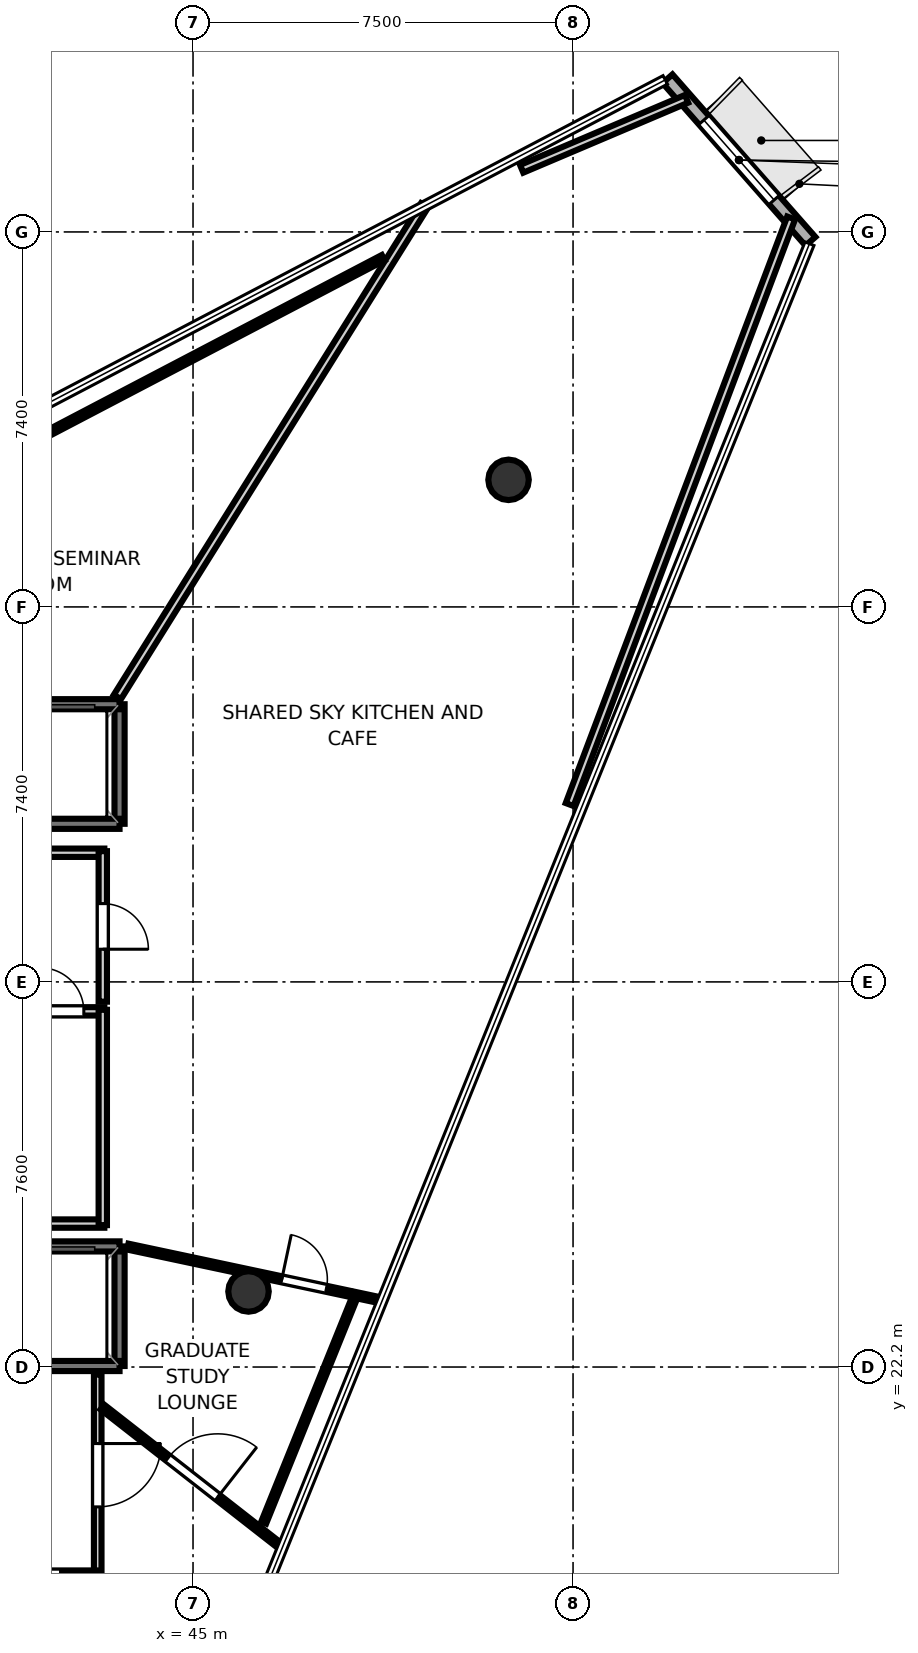
"""IFC4 building model, lengths in metres.
Left out: names, types, materials, properties, quantities, classifications, styles, units other than length and angle.
Written with IfcOpenShell. Run it as: python <this file> out.ifc"""

import sys

from ifc_helpers import new_model, si_unit, direction, frame, frame_2d, origin, origin_2d, place, context, subcontext, project, spatial, rectangle, hollow_circle, extrude, element, fill, save


model = new_model("IFC4")
c1 = context("Model", 3, precision=1e-05, world=origin(), true_north=direction((0.0, 1.0)))
c2 = subcontext(c1, "Body", "Model", "MODEL_VIEW")
j1 = project(units=[si_unit("LENGTHUNIT", "METRE"), si_unit("PLANEANGLEUNIT", "RADIAN")], contexts=[c1])
p1 = place(None, origin())
s1 = spatial("IfcSite", under=j1, at=p1, CompositionType="ELEMENT")
p2 = place(p1, origin())
s2 = spatial("IfcBuilding", under=s1, at=p2, CompositionType="ELEMENT")
p3 = place(p2, frame((0.0, 0.0, 351.8)))
s3 = spatial("IfcBuildingStorey", under=s2, at=p3, CompositionType="ELEMENT", Elevation=351.8)
for number, where, z_axis, x_axis in (
    (1, (51.227, 39.708, 0.0), (0.0, 0.0, 1.0), (1.0, 0.0, 0.0)),
    (2, (46.095, 23.691, 0.0), (0.0, 0.0, 1.0), (1.0, 0.0, 0.0)),
):
    element("IfcColumn", number, at=place(p3, frame(where, z_axis=z_axis, x_axis=x_axis)), inside=s3, PredefinedType="COLUMN", context=c2, shape_type="SweptSolid", body=[
        extrude(hollow_circle(Radius=0.4, WallThickness=0.022, at=origin_2d()), origin(), (0.0, 0.0, 1.0), 4.5),
    ])
p4 = place(p3, frame((57.185, 44.415, 0.0), z_axis=(0.0, 0.0, 1.0), x_axis=(-0.660250400188, 0.751045543926, 0.0)))
e3 = element("IfcWall", 3, at=p4, inside=s3, PredefinedType="SOLIDWALL", context=c2, shape_type="SweptSolid", body=[
    extrude(rectangle(XDim=4.273, YDim=0.26, at=frame_2d((2.136, 0.0))), origin(), (0.0, 0.0, 1.0), 4.3),
])
p5 = place(p4, frame((1.086, 0.0, 0.85)))
e4 = element("IfcOpeningElement", 4, at=p5, cuts=e3, PredefinedType="OPENING", context=c2, shape_type="SweptSolid", body=[
    extrude(rectangle(XDim=2.1, YDim=2.2, at=frame_2d((1.05, 1.1))), frame((0.0, 0.14, 0.0), z_axis=(0.0, -1.0, 0.0), x_axis=(1.0, 0.0, 0.0)), (0.0, 0.0, 1.0), 0.28),
])
p6 = place(p3, frame((43.55, 22.22, 0.0), z_axis=(0.0, 0.0, 1.0), x_axis=(0.0, 1.0, 0.0)))
e5 = element("IfcWall", 5, at=p6, inside=s3, PredefinedType="SOLIDWALL", context=c2, shape_type="SweptSolid", body=[
    extrude(rectangle(XDim=2.36, YDim=0.2, at=frame_2d((1.18, 0.0))), origin(), (0.0, 0.0, 1.0), 4.3),
])
for number, where, z_axis, x_axis in (
    (6, (41.45, 24.58, 0.0), (0.0, 0.0, 1.0), (1.0, 0.0, 0.0)),
    (7, (41.45, 22.22, 0.0), (0.0, 0.0, 1.0), (1.0, 0.0, 0.0)),
):
    element("IfcWall", number, at=place(p3, frame(where, z_axis=z_axis, x_axis=x_axis)), inside=s3, PredefinedType="SOLIDWALL", context=c2, shape_type="SweptSolid", body=[
        extrude(rectangle(XDim=2.1, YDim=0.2, at=frame_2d((1.05, 0.0))), origin(), (0.0, 0.0, 1.0), 4.3),
    ])
p7 = place(p3, frame((43.55, 32.92, 0.0), z_axis=(0.0, 0.0, 1.0), x_axis=(0.0, 1.0, 0.0)))
e8 = element("IfcWall", 8, at=p7, inside=s3, PredefinedType="SOLIDWALL", context=c2, shape_type="SweptSolid", body=[
    extrude(rectangle(XDim=2.36, YDim=0.2, at=frame_2d((1.18, 0.0))), origin(), (0.0, 0.0, 1.0), 4.3),
])
for number, where, z_axis, x_axis in (
    (9, (41.45, 35.28, 0.0), (0.0, 0.0, 1.0), (1.0, 0.0, 0.0)),
    (10, (41.45, 32.92, 0.0), (0.0, 0.0, 1.0), (1.0, 0.0, 0.0)),
):
    element("IfcWall", number, at=place(p3, frame(where, z_axis=z_axis, x_axis=x_axis)), inside=s3, PredefinedType="SOLIDWALL", context=c2, shape_type="SweptSolid", body=[
        extrude(rectangle(XDim=2.1, YDim=0.2, at=frame_2d((1.05, 0.0))), origin(), (0.0, 0.0, 1.0), 4.3),
    ])
p8 = place(p3, frame((43.119, 22.05, 0.0), z_axis=(0.0, 0.0, 1.0), x_axis=(0.0, -1.0, 0.0)))
e11 = element("IfcWall", 11, at=p8, inside=s3, PredefinedType="PARTITIONING", context=c2, shape_type="SweptSolid", body=[
    extrude(rectangle(XDim=3.97, YDim=0.15, at=frame_2d((1.985, 0.0))), origin(), (0.0, 0.0, 1.0), 2.82),
])
p9 = place(p8, frame((1.36, 0.0, 0.0)))
e12 = element("IfcOpeningElement", 12, at=p9, cuts=e11, PredefinedType="OPENING", context=c2, shape_type="SweptSolid", body=[
    extrude(rectangle(XDim=1.25, YDim=2.2, at=frame_2d((0.625, 1.1))), frame((0.0, 0.085, 0.0), z_axis=(0.0, -1.0, 0.0), x_axis=(1.0, 0.0, 0.0)), (0.0, 0.0, 1.0), 0.17),
])
p10 = place(p3, frame((43.15, 18.111, 0.0), z_axis=(0.0, 0.0, 1.0), x_axis=(-1.0, 0.0, 0.0)))
e13 = element("IfcWall", 13, at=p10, inside=s3, PredefinedType="PARTITIONING", context=c2, shape_type="SweptSolid", body=[
    extrude(rectangle(XDim=2.73, YDim=0.15, at=frame_2d((1.365, 0.0))), origin(), (0.0, 0.0, 1.0), 2.82),
])
p11 = place(p10, frame((0.765, 0.0, 0.0)))
e14 = element("IfcOpeningElement", 14, at=p11, cuts=e13, PredefinedType="OPENING", context=c2, shape_type="SweptSolid", body=[
    extrude(rectangle(XDim=1.2, YDim=2.15, at=frame_2d((0.6, 1.075))), frame((0.0, 0.085, 0.0), z_axis=(0.0, -1.0, 0.0), x_axis=(1.0, 0.0, 0.0)), (0.0, 0.0, 1.0), 0.17),
])
p12 = place(p3, frame((43.25, 25.031, 0.0), z_axis=(0.0, 0.0, 1.0), x_axis=(-1.0, 0.0, 0.0)))
e15 = element("IfcWall", 15, at=p12, inside=s3, PredefinedType="PLUMBINGWALL", context=c2, shape_type="SweptSolid", body=[
    extrude(rectangle(XDim=1.67, YDim=0.165, at=frame_2d((0.835, 0.0))), origin(), (0.0, 0.0, 1.0), 2.82),
])
p13 = place(p3, frame((41.58, 29.219, 0.0), z_axis=(0.0, 0.0, 1.0), x_axis=(1.0, 0.0, 0.0)))
e16 = element("IfcWall", 16, at=p13, inside=s3, PredefinedType="PLUMBINGWALL", context=c2, shape_type="SweptSolid", body=[
    extrude(rectangle(XDim=1.67, YDim=0.165, at=frame_2d((0.835, 0.0))), origin(), (0.0, 0.0, 1.0), 2.82),
])
p14 = place(p13, frame((0.405, 0.0, 0.0)))
e17 = element("IfcOpeningElement", 17, at=p14, cuts=e16, PredefinedType="OPENING", context=c2, shape_type="SweptSolid", body=[
    extrude(rectangle(XDim=0.86, YDim=2.05, at=frame_2d((0.43, 1.025))), frame((0.0, 0.093, 0.0), z_axis=(0.0, -1.0, 0.0), x_axis=(1.0, 0.0, 0.0)), (0.0, 0.0, 1.0), 0.185),
])
p15 = place(p3, frame((43.219, 29.25, 0.0), z_axis=(0.0, 0.0, 1.0), x_axis=(0.0, -1.0, 0.0)))
e18 = element("IfcWall", 18, at=p15, inside=s3, PredefinedType="PLUMBINGWALL", context=c2, shape_type="SweptSolid", body=[
    extrude(rectangle(XDim=4.25, YDim=0.165, at=frame_2d((2.125, 0.0))), origin(), (0.0, 0.0, 1.0), 2.82),
])
p16 = place(p3, frame((41.58, 32.349, 0.0), z_axis=(0.0, 0.0, 1.0), x_axis=(1.0, 0.0, 0.0)))
e19 = element("IfcWall", 19, at=p16, inside=s3, PredefinedType="PLUMBINGWALL", context=c2, shape_type="SweptSolid", body=[
    extrude(rectangle(XDim=1.67, YDim=0.165, at=frame_2d((0.835, 0.0))), origin(), (0.0, 0.0, 1.0), 2.82),
])
p17 = place(p3, frame((43.219, 32.38, 0.0), z_axis=(0.0, 0.0, 1.0), x_axis=(0.0, -1.0, 0.0)))
e20 = element("IfcWall", 20, at=p17, inside=s3, PredefinedType="PLUMBINGWALL", context=c2, shape_type="SweptSolid", body=[
    extrude(rectangle(XDim=2.97, YDim=0.165, at=frame_2d((1.485, 0.0))), origin(), (0.0, 0.0, 1.0), 2.82),
])
p18 = place(p17, frame((1.035, 0.0, 0.0)))
e21 = element("IfcOpeningElement", 21, at=p18, cuts=e20, PredefinedType="OPENING", context=c2, shape_type="SweptSolid", body=[
    extrude(rectangle(XDim=0.9, YDim=2.1, at=frame_2d((0.45, 1.05))), frame((0.0, 0.093, 0.0), z_axis=(0.0, -1.0, 0.0), x_axis=(1.0, 0.0, 0.0)), (0.0, 0.0, 1.0), 0.185),
])
p19 = place(p3, frame((43.211, 21.41, 0.0), z_axis=(0.0, 0.0, 1.0), x_axis=(0.788014562356, -0.615656600318, 0.0)))
e22 = element("IfcWall", 22, at=p19, inside=s3, PredefinedType="PARTITIONING", context=c2, shape_type="SweptSolid", body=[
    extrude(rectangle(XDim=4.527, YDim=0.12, at=frame_2d((2.264, 0.0))), origin(), (0.0, 0.0, 1.0), 2.82),
])
p20 = place(p19, frame((1.638, 0.0, 0.0)))
e23 = element("IfcOpeningElement", 23, at=p20, cuts=e22, PredefinedType="OPENING", context=c2, shape_type="SweptSolid", body=[
    extrude(rectangle(XDim=1.25, YDim=2.2, at=frame_2d((0.625, 1.1))), frame((0.0, 0.07, 0.0), z_axis=(0.0, -1.0, 0.0), x_axis=(1.0, 0.0, 0.0)), (0.0, 0.0, 1.0), 0.14),
])
p21 = place(p3, frame((43.713, 24.576, 0.0), z_axis=(0.0, 0.0, 1.0), x_axis=(0.978143673995, -0.207930163816, 0.0)))
e24 = element("IfcWall", 24, at=p21, inside=s3, PredefinedType="PARTITIONING", context=c2, shape_type="SweptSolid", body=[
    extrude(rectangle(XDim=5.152, YDim=0.12, at=frame_2d((2.576, 0.0))), origin(), (0.0, 0.0, 1.0), 2.82),
])
p22 = place(p21, frame((3.106, 0.0, 0.0)))
e25 = element("IfcOpeningElement", 25, at=p22, cuts=e24, PredefinedType="OPENING", context=c2, shape_type="SweptSolid", body=[
    extrude(rectangle(XDim=0.9, YDim=2.1, at=frame_2d((0.45, 1.05))), frame((0.0, 0.07, 0.0), z_axis=(0.0, -1.0, 0.0), x_axis=(1.0, 0.0, 0.0)), (0.0, 0.0, 1.0), 0.14),
])
p23 = place(p3, frame((48.224, 23.654, 0.0), z_axis=(0.0, 0.0, 1.0), x_axis=(-0.374802895176, -0.927104519333, 0.0)))
e26 = element("IfcWall", 26, at=p23, inside=s3, PredefinedType="PARTITIONING", context=c2, shape_type="SweptSolid", body=[
    extrude(rectangle(XDim=4.882, YDim=0.105, at=frame_2d((2.441, 0.0))), origin(), (0.0, 0.0, 1.0), 2.82),
])
p24 = place(p3, frame((43.508, 35.424, 0.0), z_axis=(0.0, 0.0, 1.0), x_axis=(0.529920277959, 0.848047462709, 0.0)))
e27 = element("IfcWall", 27, at=p24, inside=s3, PredefinedType="PLUMBINGWALL", context=c2, shape_type="SweptSolid", body=[
    extrude(rectangle(XDim=11.438, YDim=0.165, at=frame_2d((5.719, 0.0))), origin(), (0.0, 0.0, 1.0), 2.82),
])
p25 = place(p3, frame((51.486, 45.845, 0.0), z_axis=(0.0, 0.0, 1.0), x_axis=(0.920504254139, 0.390732540381, 0.0)))
e28 = element("IfcWall", 28, at=p25, inside=s3, PredefinedType="PLUMBINGWALL", context=c2, shape_type="SweptSolid", body=[
    extrude(rectangle(XDim=3.535, YDim=0.165, at=frame_2d((1.767, 0.0))), origin(), (0.0, 0.0, 1.0), 2.82),
])
p26 = place(p3, frame((56.804, 44.875, 0.0), z_axis=(0.0, 0.0, 1.0), x_axis=(-0.353300031095, -0.935510068374, 0.0)))
e29 = element("IfcWall", 29, at=p26, inside=s3, PredefinedType="PLUMBINGWALL", context=c2, shape_type="SweptSolid", body=[
    extrude(rectangle(XDim=12.373, YDim=0.165, at=frame_2d((6.187, 0.0))), origin(), (0.0, 0.0, 1.0), 2.82),
])
p27 = place(p3, frame((34.448, 36.601, 0.0), z_axis=(0.0, 0.0, 1.0), x_axis=(0.885897810841, 0.46388044661, 0.0)))
e30 = element("IfcWall", 30, at=p27, inside=s3, PredefinedType="PARTITIONING", context=c2, shape_type="SweptSolid", body=[
    extrude(rectangle(XDim=16.148, YDim=0.12, at=frame_2d((8.074, 0.0))), origin(), (0.0, 0.0, 1.0), 2.82),
])
p28 = place(p11, origin())
e31 = element("IfcDoor", 31, at=p28, inside=s3, OperationType="SINGLE_SWING_RIGHT", PredefinedType="DOOR", context=c2, shape_type="SweptSolid", body=[
    extrude(rectangle(XDim=1.2, YDim=2.15, at=frame_2d((0.6, 1.075))), frame((0.0, 0.025, 0.0), z_axis=(0.0, -1.0, 0.0), x_axis=(1.0, 0.0, 0.0)), (0.0, 0.0, 1.0), 0.05),
])
fill(e14, e31)
p29 = place(p9, origin())
e32 = element("IfcDoor", 32, at=p29, inside=s3, OperationType="SINGLE_SWING_LEFT", PredefinedType="DOOR", context=c2, shape_type="SweptSolid", body=[
    extrude(rectangle(XDim=1.25, YDim=2.2, at=frame_2d((0.625, 1.1))), frame((0.0, 0.025, 0.0), z_axis=(0.0, -1.0, 0.0), x_axis=(1.0, 0.0, 0.0)), (0.0, 0.0, 1.0), 0.05),
])
fill(e12, e32)
p30 = place(p20, origin())
e33 = element("IfcDoor", 33, at=p30, inside=s3, OperationType="SINGLE_SWING_RIGHT", PredefinedType="DOOR", context=c2, shape_type="SweptSolid", body=[
    extrude(rectangle(XDim=1.25, YDim=2.2, at=frame_2d((0.625, 1.1))), frame((0.0, 0.025, 0.0), z_axis=(0.0, -1.0, 0.0), x_axis=(1.0, 0.0, 0.0)), (0.0, 0.0, 1.0), 0.05),
])
fill(e23, e33)
p31 = place(p22, origin())
e34 = element("IfcDoor", 34, at=p31, inside=s3, OperationType="SINGLE_SWING_LEFT", PredefinedType="DOOR", context=c2, shape_type="SweptSolid", body=[
    extrude(rectangle(XDim=0.9, YDim=2.1, at=frame_2d((0.45, 1.05))), frame((0.0, 0.025, 0.0), z_axis=(0.0, -1.0, 0.0), x_axis=(1.0, 0.0, 0.0)), (0.0, 0.0, 1.0), 0.05),
])
fill(e25, e34)
p32 = place(p18, origin())
e35 = element("IfcDoor", 35, at=p32, inside=s3, OperationType="SINGLE_SWING_RIGHT", PredefinedType="DOOR", context=c2, shape_type="SweptSolid", body=[
    extrude(rectangle(XDim=0.9, YDim=2.1, at=frame_2d((0.45, 1.05))), frame((0.0, 0.025, 0.0), z_axis=(0.0, -1.0, 0.0), x_axis=(1.0, 0.0, 0.0)), (0.0, 0.0, 1.0), 0.05),
])
fill(e21, e35)
p33 = place(p14, origin())
e36 = element("IfcDoor", 36, at=p33, inside=s3, OperationType="SINGLE_SWING_LEFT", PredefinedType="DOOR", context=c2, shape_type="SweptSolid", body=[
    extrude(rectangle(XDim=0.86, YDim=2.05, at=frame_2d((0.43, 1.025))), frame((0.0, 0.025, 0.0), z_axis=(0.0, -1.0, 0.0), x_axis=(1.0, 0.0, 0.0)), (0.0, 0.0, 1.0), 0.05),
])
fill(e17, e36)
p34 = place(p5, origin())
e37 = element("IfcWindow", 37, at=p34, inside=s3, PartitioningType="SINGLE_PANEL", PredefinedType="WINDOW", context=c2, shape_type="SweptSolid", body=[
    extrude(rectangle(XDim=2.1, YDim=2.2, at=frame_2d((1.05, 1.1))), frame((0.0, 0.03, 0.0), z_axis=(0.0, -1.0, 0.0), x_axis=(1.0, 0.0, 0.0)), (0.0, 0.0, 1.0), 0.06),
])
fill(e4, e37)
save(model, sys.argv[1])
